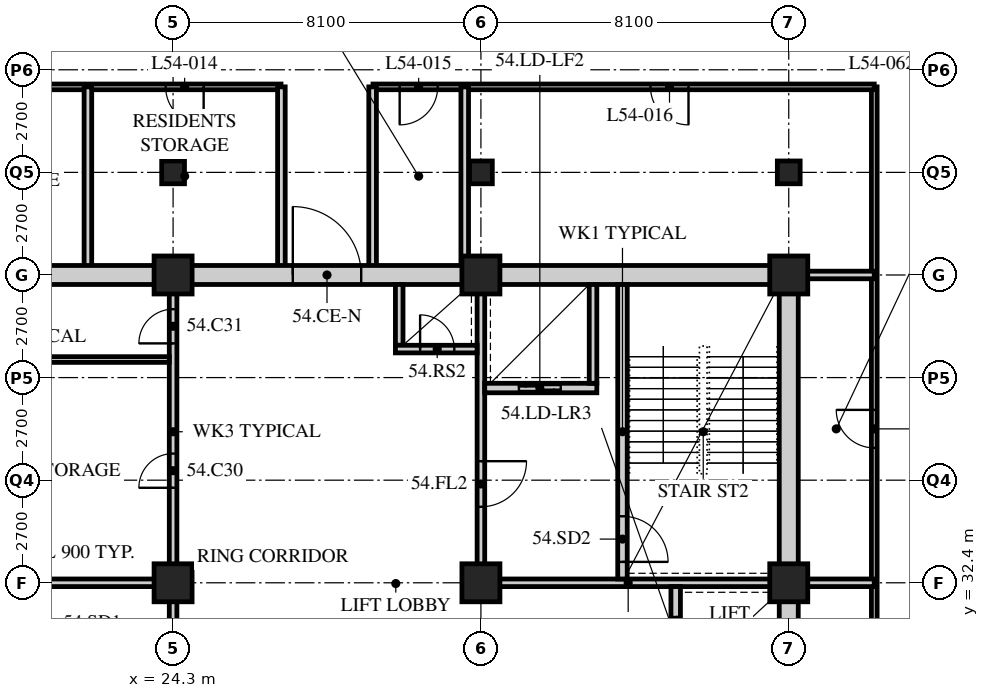
"""IFC4 building model, lengths in metres.
Left out: names, types, materials, properties, quantities, classifications, styles, units other than length and angle.
Written with IfcOpenShell. Run it as: python <this file> out.ifc"""

import sys

from ifc_helpers import new_model, si_unit, direction, frame, frame_2d, origin, origin_2d, place, context, subcontext, project, spatial, rectangle, hollow_rectangle, extrude, element, fill, save


model = new_model("IFC4")
c1 = context("Model", 3, precision=1e-05, world=origin(), true_north=direction((0.0, 1.0)))
c2 = subcontext(c1, "Body", "Model", "MODEL_VIEW")
j1 = project(units=[si_unit("LENGTHUNIT", "METRE"), si_unit("PLANEANGLEUNIT", "RADIAN")], contexts=[c1])
p1 = place(None, origin())
s1 = spatial("IfcSite", under=j1, at=p1, CompositionType="ELEMENT")
p2 = place(p1, origin())
s2 = spatial("IfcBuilding", under=s1, at=p2, CompositionType="ELEMENT")
p3 = place(p2, frame((0.0, 0.0, 210.0)))
s3 = spatial("IfcBuildingStorey", under=s2, at=p3, CompositionType="ELEMENT", Elevation=210.0)
for number, where, z_axis, x_axis in (
    (1, (24.3, 32.4, 0.0), (0.0, 0.0, 1.0), (1.0, 0.0, 0.0)),
    (2, (24.3, 40.5, 0.0), (0.0, 0.0, 1.0), (1.0, 0.0, 0.0)),
):
    element("IfcColumn", number, at=place(p3, frame(where, z_axis=z_axis, x_axis=x_axis)), inside=s3, PredefinedType="COLUMN", context=c2, shape_type="SweptSolid", body=[
        extrude(hollow_rectangle(XDim=1.0, YDim=1.0, WallThickness=0.1, at=origin_2d()), origin(), (0.0, 0.0, 1.0), 3.6),
    ])
p4 = place(p3, frame((24.3, 43.2, 0.0), z_axis=(0.0, 0.0, 1.0), x_axis=(1.0, 0.0, 0.0)))
e3 = element("IfcColumn", 3, at=p4, inside=s3, PredefinedType="COLUMN", context=c2, shape_type="SweptSolid", body=[
    extrude(hollow_rectangle(XDim=0.6, YDim=0.6, WallThickness=0.05, at=origin_2d()), origin(), (0.0, 0.0, 1.0), 3.6),
])
for number, where, z_axis, x_axis in (
    (4, (32.4, 32.4, 0.0), (0.0, 0.0, 1.0), (1.0, 0.0, 0.0)),
    (5, (32.4, 40.5, 0.0), (0.0, 0.0, 1.0), (1.0, 0.0, 0.0)),
):
    element("IfcColumn", number, at=place(p3, frame(where, z_axis=z_axis, x_axis=x_axis)), inside=s3, PredefinedType="COLUMN", context=c2, shape_type="SweptSolid", body=[
        extrude(hollow_rectangle(XDim=1.0, YDim=1.0, WallThickness=0.1, at=origin_2d()), origin(), (0.0, 0.0, 1.0), 3.6),
    ])
p5 = place(p3, frame((32.4, 43.2, 0.0), z_axis=(0.0, 0.0, 1.0), x_axis=(1.0, 0.0, 0.0)))
e6 = element("IfcColumn", 6, at=p5, inside=s3, PredefinedType="COLUMN", context=c2, shape_type="SweptSolid", body=[
    extrude(hollow_rectangle(XDim=0.6, YDim=0.6, WallThickness=0.05, at=origin_2d()), origin(), (0.0, 0.0, 1.0), 3.6),
])
for number, where, z_axis, x_axis in (
    (7, (40.5, 32.4, 0.0), (0.0, 0.0, 1.0), (1.0, 0.0, 0.0)),
    (8, (40.5, 40.5, 0.0), (0.0, 0.0, 1.0), (1.0, 0.0, 0.0)),
):
    element("IfcColumn", number, at=place(p3, frame(where, z_axis=z_axis, x_axis=x_axis)), inside=s3, PredefinedType="COLUMN", context=c2, shape_type="SweptSolid", body=[
        extrude(hollow_rectangle(XDim=1.0, YDim=1.0, WallThickness=0.1, at=origin_2d()), origin(), (0.0, 0.0, 1.0), 3.6),
    ])
p6 = place(p3, frame((40.5, 43.2, 0.0), z_axis=(0.0, 0.0, 1.0), x_axis=(1.0, 0.0, 0.0)))
e9 = element("IfcColumn", 9, at=p6, inside=s3, PredefinedType="COLUMN", context=c2, shape_type="SweptSolid", body=[
    extrude(hollow_rectangle(XDim=0.6, YDim=0.6, WallThickness=0.05, at=origin_2d()), origin(), (0.0, 0.0, 1.0), 3.6),
])
p7 = place(p3, frame((42.75, 20.7, 0.0), z_axis=(0.0, 0.0, 1.0), x_axis=(0.0, 1.0, 0.0)))
e10 = element("IfcWall", 10, at=p7, inside=s3, PredefinedType="PARTITIONING", context=c2, shape_type="SweptSolid", body=[
    extrude(rectangle(XDim=24.75, YDim=0.15, at=frame_2d((12.375, 0.0))), origin(), (0.0, 0.0, 1.0), 3.39),
])
p8 = place(p7, frame((7.15, 0.0, 0.0)))
e11 = element("IfcOpeningElement", 11, at=p8, cuts=e10, PredefinedType="OPENING", context=c2, shape_type="SweptSolid", body=[
    extrude(rectangle(XDim=1.0, YDim=2.1, at=frame_2d((0.5, 1.05))), frame((0.0, 0.085, 0.0), z_axis=(0.0, -1.0, 0.0), x_axis=(1.0, 0.0, 0.0)), (0.0, 0.0, 1.0), 0.17),
])
p9 = place(p7, frame((15.25, 0.0, 0.0)))
e12 = element("IfcOpeningElement", 12, at=p9, cuts=e10, PredefinedType="OPENING", context=c2, shape_type="SweptSolid", body=[
    extrude(rectangle(XDim=1.0, YDim=2.1, at=frame_2d((0.5, 1.05))), frame((0.0, 0.085, 0.0), z_axis=(0.0, -1.0, 0.0), x_axis=(1.0, 0.0, 0.0)), (0.0, 0.0, 1.0), 0.17),
])
p10 = place(p3, frame((42.75, 45.45, 0.0), z_axis=(0.0, 0.0, 1.0), x_axis=(-1.0, 0.0, 0.0)))
e13 = element("IfcWall", 13, at=p10, inside=s3, PredefinedType="PARTITIONING", context=c2, shape_type="SweptSolid", body=[
    extrude(rectangle(XDim=13.19, YDim=0.15, at=frame_2d((6.595, 0.0))), origin(), (0.0, 0.0, 1.0), 3.39),
])
p11 = place(p10, frame((11.488, 0.0, 0.0)))
e14 = element("IfcOpeningElement", 14, at=p11, cuts=e13, PredefinedType="OPENING", context=c2, shape_type="SweptSolid", body=[
    extrude(rectangle(XDim=1.0, YDim=2.1, at=frame_2d((0.5, 1.05))), frame((0.0, 0.085, 0.0), z_axis=(0.0, -1.0, 0.0), x_axis=(1.0, 0.0, 0.0)), (0.0, 0.0, 1.0), 0.17),
])
p12 = place(p10, frame((4.888, 0.0, 0.0)))
e15 = element("IfcOpeningElement", 15, at=p12, cuts=e13, PredefinedType="OPENING", context=c2, shape_type="SweptSolid", body=[
    extrude(rectangle(XDim=1.0, YDim=2.1, at=frame_2d((0.5, 1.05))), frame((0.0, 0.085, 0.0), z_axis=(0.0, -1.0, 0.0), x_axis=(1.0, 0.0, 0.0)), (0.0, 0.0, 1.0), 0.17),
])
p13 = place(p3, frame((27.14, 45.45, 0.0), z_axis=(0.0, 0.0, 1.0), x_axis=(-1.0, 0.0, 0.0)))
e16 = element("IfcWall", 16, at=p13, inside=s3, PredefinedType="PARTITIONING", context=c2, shape_type="SweptSolid", body=[
    extrude(rectangle(XDim=17.24, YDim=0.15, at=frame_2d((8.62, 0.0))), origin(), (0.0, 0.0, 1.0), 3.39),
])
p14 = place(p13, frame((15.94, 0.0, 0.0)))
e17 = element("IfcOpeningElement", 17, at=p14, cuts=e16, PredefinedType="OPENING", context=c2, shape_type="SweptSolid", body=[
    extrude(rectangle(XDim=1.0, YDim=2.1, at=frame_2d((0.5, 1.05))), frame((0.0, 0.085, 0.0), z_axis=(0.0, -1.0, 0.0), x_axis=(1.0, 0.0, 0.0)), (0.0, 0.0, 1.0), 0.17),
])
p15 = place(p13, frame((12.79, 0.0, 0.0)))
e18 = element("IfcOpeningElement", 18, at=p15, cuts=e16, PredefinedType="OPENING", context=c2, shape_type="SweptSolid", body=[
    extrude(rectangle(XDim=1.0, YDim=2.1, at=frame_2d((0.5, 1.05))), frame((0.0, 0.085, 0.0), z_axis=(0.0, -1.0, 0.0), x_axis=(1.0, 0.0, 0.0)), (0.0, 0.0, 1.0), 0.17),
])
p16 = place(p13, frame((7.511, 0.0, 0.0)))
e19 = element("IfcOpeningElement", 19, at=p16, cuts=e16, PredefinedType="OPENING", context=c2, shape_type="SweptSolid", body=[
    extrude(rectangle(XDim=1.0, YDim=2.1, at=frame_2d((0.5, 1.05))), frame((0.0, 0.085, 0.0), z_axis=(0.0, -1.0, 0.0), x_axis=(1.0, 0.0, 0.0)), (0.0, 0.0, 1.0), 0.17),
])
p17 = place(p13, frame((2.036, 0.0, 0.0)))
e20 = element("IfcOpeningElement", 20, at=p17, cuts=e16, PredefinedType="OPENING", context=c2, shape_type="SweptSolid", body=[
    extrude(rectangle(XDim=1.0, YDim=2.1, at=frame_2d((0.5, 1.05))), frame((0.0, 0.085, 0.0), z_axis=(0.0, -1.0, 0.0), x_axis=(1.0, 0.0, 0.0)), (0.0, 0.0, 1.0), 0.17),
])
p18 = place(p3, frame((40.5, 32.4, 0.0), z_axis=(0.0, 0.0, 1.0), x_axis=(1.0, 0.0, 0.0)))
e21 = element("IfcWall", 21, at=p18, inside=s3, PredefinedType="SOLIDWALL", context=c2, shape_type="SweptSolid", body=[
    extrude(rectangle(XDim=2.25, YDim=0.2, at=frame_2d((1.125, 0.0))), origin(), (0.0, 0.0, 1.0), 3.39),
])
p19 = place(p3, frame((22.059, 45.45, 0.0), z_axis=(0.0, 0.0, 1.0), x_axis=(0.0, -1.0, 0.0)))
e22 = element("IfcWall", 22, at=p19, inside=s3, PredefinedType="SOLIDWALL", context=c2, shape_type="SweptSolid", body=[
    extrude(rectangle(XDim=4.95, YDim=0.2, at=frame_2d((2.475, 0.0))), origin(), (0.0, 0.0, 1.0), 3.39),
])
p20 = place(p3, frame((31.974, 45.45, 0.0), z_axis=(0.0, 0.0, 1.0), x_axis=(0.0, -1.0, 0.0)))
e23 = element("IfcWall", 23, at=p20, inside=s3, PredefinedType="SOLIDWALL", context=c2, shape_type="SweptSolid", body=[
    extrude(rectangle(XDim=4.95, YDim=0.2, at=frame_2d((2.475, 0.0))), origin(), (0.0, 0.0, 1.0), 2.69),
])
for number, where, z_axis, x_axis in (
    (24, (27.15, 40.5, 0.0), (0.0, 0.0, 1.0), (0.0, 1.0, 0.0)),
    (25, (29.55, 40.5, 0.0), (0.0, 0.0, 1.0), (0.0, 1.0, 0.0)),
):
    element("IfcWall", number, at=place(p3, frame(where, z_axis=z_axis, x_axis=x_axis)), inside=s3, PredefinedType="SOLIDWALL", context=c2, shape_type="SweptSolid", body=[
        extrude(rectangle(XDim=4.95, YDim=0.2, at=frame_2d((2.475, 0.0))), origin(), (0.0, 0.0, 1.0), 3.39),
    ])
p21 = place(p3, frame((40.5, 40.5, 0.0), z_axis=(0.0, 0.0, 1.0), x_axis=(1.0, 0.0, 0.0)))
e26 = element("IfcWall", 26, at=p21, inside=s3, PredefinedType="SOLIDWALL", context=c2, shape_type="SweptSolid", body=[
    extrude(rectangle(XDim=2.25, YDim=0.2, at=frame_2d((1.125, 0.0))), origin(), (0.0, 0.0, 1.0), 3.39),
])
p22 = place(p3, frame((15.95, 40.5, 0.0), z_axis=(0.0, 0.0, 1.0), x_axis=(1.0, 0.0, 0.0)))
e27 = element("IfcWall", 27, at=p22, inside=s3, PredefinedType="SOLIDWALL", context=c2, shape_type="SweptSolid", body=[
    extrude(rectangle(XDim=24.8, YDim=0.5, at=frame_2d((12.4, 0.0))), origin(), (0.0, 0.0, 1.0), 2.74),
])
p23 = place(p22, frame((11.5, 0.0, 0.0)))
e28 = element("IfcOpeningElement", 28, at=p23, cuts=e27, PredefinedType="OPENING", context=c2, shape_type="SweptSolid", body=[
    extrude(rectangle(XDim=1.8, YDim=2.4, at=frame_2d((0.9, 1.2))), frame((0.0, 0.26, 0.0), z_axis=(0.0, -1.0, 0.0), x_axis=(1.0, 0.0, 0.0)), (0.0, 0.0, 1.0), 0.52),
])
p24 = place(p3, frame((40.5, 24.55, 0.0), z_axis=(0.0, 0.0, 1.0), x_axis=(0.0, 1.0, 0.0)))
e29 = element("IfcWall", 29, at=p24, inside=s3, PredefinedType="SOLIDWALL", context=c2, shape_type="SweptSolid", body=[
    extrude(rectangle(XDim=15.7, YDim=0.5, at=frame_2d((7.85, 0.0))), origin(), (0.0, 0.0, 1.0), 2.778),
])
p25 = place(p3, frame((16.45, 32.4, 0.0), z_axis=(0.0, 0.0, 1.0), x_axis=(1.0, 0.0, 0.0)))
e30 = element("IfcWall", 30, at=p25, inside=s3, PredefinedType="SOLIDWALL", context=c2, shape_type="SweptSolid", body=[
    extrude(rectangle(XDim=7.95, YDim=0.2, at=frame_2d((3.975, 0.0))), origin(), (0.0, 0.0, 1.0), 2.778),
])
p26 = place(p3, frame((24.3, 24.55, 0.0), z_axis=(0.0, 0.0, 1.0), x_axis=(0.0, 1.0, 0.0)))
e31 = element("IfcWall", 31, at=p26, inside=s3, PredefinedType="SOLIDWALL", context=c2, shape_type="SweptSolid", body=[
    extrude(rectangle(XDim=7.75, YDim=0.2, at=frame_2d((3.875, 0.0))), origin(), (0.0, 0.0, 1.0), 2.778),
])
p27 = place(p26, frame((4.6, 0.0, 0.0)))
e32 = element("IfcOpeningElement", 32, at=p27, cuts=e31, PredefinedType="OPENING", context=c2, shape_type="SweptSolid", body=[
    extrude(rectangle(XDim=1.2, YDim=2.1, at=frame_2d((0.6, 1.05))), frame((0.0, 0.11, 0.0), z_axis=(0.0, -1.0, 0.0), x_axis=(1.0, 0.0, 0.0)), (0.0, 0.0, 1.0), 0.22),
])
p28 = place(p3, frame((32.3, 32.4, 0.0), z_axis=(0.0, 0.0, 1.0), x_axis=(1.0, 0.0, 0.0)))
e33 = element("IfcWall", 33, at=p28, inside=s3, PredefinedType="SOLIDWALL", context=c2, shape_type="SweptSolid", body=[
    extrude(rectangle(XDim=7.95, YDim=0.2, at=frame_2d((3.975, 0.0))), origin(), (0.0, 0.0, 1.0), 2.778),
])
p29 = place(p3, frame((32.4, 32.5, 0.0), z_axis=(0.0, 0.0, 1.0), x_axis=(0.0, 1.0, 0.0)))
e34 = element("IfcWall", 34, at=p29, inside=s3, PredefinedType="SOLIDWALL", context=c2, shape_type="SweptSolid", body=[
    extrude(rectangle(XDim=7.75, YDim=0.2, at=frame_2d((3.875, 0.0))), origin(), (0.0, 0.0, 1.0), 2.778),
])
p30 = place(p29, frame((1.9, 0.0, 0.0)))
e35 = element("IfcOpeningElement", 35, at=p30, cuts=e34, PredefinedType="OPENING", context=c2, shape_type="SweptSolid", body=[
    extrude(rectangle(XDim=1.2, YDim=2.1, at=frame_2d((0.6, 1.05))), frame((0.0, 0.11, 0.0), z_axis=(0.0, -1.0, 0.0), x_axis=(1.0, 0.0, 0.0)), (0.0, 0.0, 1.0), 0.22),
])
p31 = place(p3, frame((37.525, 24.55, 0.0), z_axis=(0.0, 0.0, 1.0), x_axis=(0.0, 1.0, 0.0)))
e36 = element("IfcWall", 36, at=p31, inside=s3, PredefinedType="SOLIDWALL", context=c2, shape_type="SweptSolid", body=[
    extrude(rectangle(XDim=7.75, YDim=0.25, at=frame_2d((3.875, 0.0))), origin(), (0.0, 0.0, 1.0), 3.39),
])
p32 = place(p31, frame((0.65, 0.0, 0.0)))
e37 = element("IfcOpeningElement", 37, at=p32, cuts=e36, PredefinedType="OPENING", context=c2, shape_type="SweptSolid", body=[
    extrude(rectangle(XDim=1.1, YDim=2.4, at=frame_2d((0.55, 1.2))), frame((0.0, 0.135, 0.0), z_axis=(0.0, -1.0, 0.0), x_axis=(1.0, 0.0, 0.0)), (0.0, 0.0, 1.0), 0.27),
])
p33 = place(p31, frame((3.25, 0.0, 0.0)))
e38 = element("IfcOpeningElement", 38, at=p33, cuts=e36, PredefinedType="OPENING", context=c2, shape_type="SweptSolid", body=[
    extrude(rectangle(XDim=1.1, YDim=2.4, at=frame_2d((0.55, 1.2))), frame((0.0, 0.135, 0.0), z_axis=(0.0, -1.0, 0.0), x_axis=(1.0, 0.0, 0.0)), (0.0, 0.0, 1.0), 0.27),
])
p34 = place(p31, frame((5.85, 0.0, 0.0)))
e39 = element("IfcOpeningElement", 39, at=p34, cuts=e36, PredefinedType="OPENING", context=c2, shape_type="SweptSolid", body=[
    extrude(rectangle(XDim=1.1, YDim=2.4, at=frame_2d((0.55, 1.2))), frame((0.0, 0.135, 0.0), z_axis=(0.0, -1.0, 0.0), x_axis=(1.0, 0.0, 0.0)), (0.0, 0.0, 1.0), 0.27),
])
p35 = place(p3, frame((36.125, 32.5, 0.0), z_axis=(0.0, 0.0, 1.0), x_axis=(0.0, 1.0, 0.0)))
e40 = element("IfcWall", 40, at=p35, inside=s3, PredefinedType="SOLIDWALL", context=c2, shape_type="SweptSolid", body=[
    extrude(rectangle(XDim=7.75, YDim=0.25, at=frame_2d((3.875, 0.0))), origin(), (0.0, 0.0, 1.0), 3.39),
])
p36 = place(p35, frame((0.45, 0.0, 0.0)))
e41 = element("IfcOpeningElement", 41, at=p36, cuts=e40, PredefinedType="OPENING", context=c2, shape_type="SweptSolid", body=[
    extrude(rectangle(XDim=1.2, YDim=2.1, at=frame_2d((0.6, 1.05))), frame((0.0, 0.135, 0.0), z_axis=(0.0, -1.0, 0.0), x_axis=(1.0, 0.0, 0.0)), (0.0, 0.0, 1.0), 0.27),
])
p37 = place(p3, frame((32.5, 37.525, 0.0), z_axis=(0.0, 0.0, 1.0), x_axis=(1.0, 0.0, 0.0)))
e42 = element("IfcWall", 42, at=p37, inside=s3, PredefinedType="SOLIDWALL", context=c2, shape_type="SweptSolid", body=[
    extrude(rectangle(XDim=2.95, YDim=0.25, at=frame_2d((1.475, 0.0))), origin(), (0.0, 0.0, 1.0), 3.39),
])
p38 = place(p37, frame((0.9, 0.0, 0.0)))
e43 = element("IfcOpeningElement", 43, at=p38, cuts=e42, PredefinedType="OPENING", context=c2, shape_type="SweptSolid", body=[
    extrude(rectangle(XDim=1.1, YDim=2.4, at=frame_2d((0.55, 1.2))), frame((0.0, 0.135, 0.0), z_axis=(0.0, -1.0, 0.0), x_axis=(1.0, 0.0, 0.0)), (0.0, 0.0, 1.0), 0.27),
])
p39 = place(p3, frame((35.35, 37.65, 0.0), z_axis=(0.0, 0.0, 1.0), x_axis=(0.0, 1.0, 0.0)))
e44 = element("IfcWall", 44, at=p39, inside=s3, PredefinedType="SOLIDWALL", context=c2, shape_type="SweptSolid", body=[
    extrude(rectangle(XDim=2.6, YDim=0.2, at=frame_2d((1.3, 0.0))), origin(), (0.0, 0.0, 1.0), 3.39),
])
p40 = place(p3, frame((30.25, 38.65, 0.0), z_axis=(0.0, 0.0, 1.0), x_axis=(0.0, 1.0, 0.0)))
e45 = element("IfcWall", 45, at=p40, inside=s3, PredefinedType="SOLIDWALL", context=c2, shape_type="SweptSolid", body=[
    extrude(rectangle(XDim=1.6, YDim=0.2, at=frame_2d((0.8, 0.0))), origin(), (0.0, 0.0, 1.0), 3.39),
])
p41 = place(p3, frame((30.15, 38.55, 0.0), z_axis=(0.0, 0.0, 1.0), x_axis=(1.0, 0.0, 0.0)))
e46 = element("IfcWall", 46, at=p41, inside=s3, PredefinedType="SOLIDWALL", context=c2, shape_type="SweptSolid", body=[
    extrude(rectangle(XDim=2.15, YDim=0.2, at=frame_2d((1.075, 0.0))), origin(), (0.0, 0.0, 1.0), 3.39),
])
p42 = place(p41, frame((0.65, 0.0, 0.0)))
e47 = element("IfcOpeningElement", 47, at=p42, cuts=e46, PredefinedType="OPENING", context=c2, shape_type="SweptSolid", body=[
    extrude(rectangle(XDim=0.9, YDim=2.1, at=frame_2d((0.45, 1.05))), frame((0.0, 0.11, 0.0), z_axis=(0.0, -1.0, 0.0), x_axis=(1.0, 0.0, 0.0)), (0.0, 0.0, 1.0), 0.22),
])
p43 = place(p3, frame((24.3, 32.5, 0.0), z_axis=(0.0, 0.0, 1.0), x_axis=(0.0, 1.0, 0.0)))
e48 = element("IfcWall", 48, at=p43, inside=s3, PredefinedType="PARTITIONING", context=c2, shape_type="SweptSolid", body=[
    extrude(rectangle(XDim=7.75, YDim=0.2, at=frame_2d((3.875, 0.0))), origin(), (0.0, 0.0, 1.0), 2.778),
])
p44 = place(p43, frame((2.4, 0.0, 0.0)))
e49 = element("IfcOpeningElement", 49, at=p44, cuts=e48, PredefinedType="OPENING", context=c2, shape_type="SweptSolid", body=[
    extrude(rectangle(XDim=0.9, YDim=2.1, at=frame_2d((0.45, 1.05))), frame((0.0, 0.11, 0.0), z_axis=(0.0, -1.0, 0.0), x_axis=(1.0, 0.0, 0.0)), (0.0, 0.0, 1.0), 0.22),
])
p45 = place(p43, frame((6.2, 0.0, 0.0)))
e50 = element("IfcOpeningElement", 50, at=p45, cuts=e48, PredefinedType="OPENING", context=c2, shape_type="SweptSolid", body=[
    extrude(rectangle(XDim=0.9, YDim=2.1, at=frame_2d((0.45, 1.05))), frame((0.0, 0.11, 0.0), z_axis=(0.0, -1.0, 0.0), x_axis=(1.0, 0.0, 0.0)), (0.0, 0.0, 1.0), 0.22),
])
p46 = place(p3, frame((16.45, 38.275, 0.0), z_axis=(0.0, 0.0, 1.0), x_axis=(1.0, 0.0, 0.0)))
e51 = element("IfcWall", 51, at=p46, inside=s3, PredefinedType="PARTITIONING", context=c2, shape_type="SweptSolid", body=[
    extrude(rectangle(XDim=7.75, YDim=0.15, at=frame_2d((3.875, 0.0))), origin(), (0.0, 0.0, 1.0), 3.39),
])
p47 = place(p9, origin())
e52 = element("IfcDoor", 52, at=p47, inside=s3, OperationType="SINGLE_SWING_RIGHT", PredefinedType="DOOR", context=c2, shape_type="SweptSolid", body=[
    extrude(rectangle(XDim=1.0, YDim=2.1, at=frame_2d((0.5, 1.05))), frame((0.0, 0.025, 0.0), z_axis=(0.0, -1.0, 0.0), x_axis=(1.0, 0.0, 0.0)), (0.0, 0.0, 1.0), 0.05),
])
fill(e12, e52)
p48 = place(p17, origin())
e53 = element("IfcDoor", 53, at=p48, inside=s3, OperationType="SINGLE_SWING_LEFT", PredefinedType="DOOR", context=c2, shape_type="SweptSolid", body=[
    extrude(rectangle(XDim=1.0, YDim=2.1, at=frame_2d((0.5, 1.05))), frame((0.0, 0.025, 0.0), z_axis=(0.0, -1.0, 0.0), x_axis=(1.0, 0.0, 0.0)), (0.0, 0.0, 1.0), 0.05),
])
fill(e20, e53)
p49 = place(p11, origin())
e54 = element("IfcDoor", 54, at=p49, inside=s3, OperationType="SINGLE_SWING_RIGHT", PredefinedType="DOOR", context=c2, shape_type="SweptSolid", body=[
    extrude(rectangle(XDim=1.0, YDim=2.1, at=frame_2d((0.5, 1.05))), frame((0.0, 0.025, 0.0), z_axis=(0.0, -1.0, 0.0), x_axis=(1.0, 0.0, 0.0)), (0.0, 0.0, 1.0), 0.05),
])
fill(e14, e54)
p50 = place(p12, origin())
e55 = element("IfcDoor", 55, at=p50, inside=s3, OperationType="SINGLE_SWING_LEFT", PredefinedType="DOOR", context=c2, shape_type="SweptSolid", body=[
    extrude(rectangle(XDim=1.0, YDim=2.1, at=frame_2d((0.5, 1.05))), frame((0.0, 0.025, 0.0), z_axis=(0.0, -1.0, 0.0), x_axis=(1.0, 0.0, 0.0)), (0.0, 0.0, 1.0), 0.05),
])
fill(e15, e55)
p51 = place(p44, origin())
e56 = element("IfcDoor", 56, at=p51, inside=s3, OperationType="SINGLE_SWING_LEFT", PredefinedType="DOOR", context=c2, shape_type="SweptSolid", body=[
    extrude(rectangle(XDim=0.9, YDim=2.1, at=frame_2d((0.45, 1.05))), frame((0.0, 0.025, 0.0), z_axis=(0.0, -1.0, 0.0), x_axis=(1.0, 0.0, 0.0)), (0.0, 0.0, 1.0), 0.05),
])
fill(e49, e56)
p52 = place(p45, origin())
e57 = element("IfcDoor", 57, at=p52, inside=s3, OperationType="SINGLE_SWING_LEFT", PredefinedType="DOOR", context=c2, shape_type="SweptSolid", body=[
    extrude(rectangle(XDim=0.9, YDim=2.1, at=frame_2d((0.45, 1.05))), frame((0.0, 0.025, 0.0), z_axis=(0.0, -1.0, 0.0), x_axis=(1.0, 0.0, 0.0)), (0.0, 0.0, 1.0), 0.05),
])
fill(e50, e57)
p53 = place(p36, origin())
e58 = element("IfcDoor", 58, at=p53, inside=s3, OperationType="SINGLE_SWING_RIGHT", PredefinedType="DOOR", context=c2, shape_type="SweptSolid", body=[
    extrude(rectangle(XDim=1.2, YDim=2.1, at=frame_2d((0.6, 1.05))), frame((0.0, 0.025, 0.0), z_axis=(0.0, -1.0, 0.0), x_axis=(1.0, 0.0, 0.0)), (0.0, 0.0, 1.0), 0.05),
])
fill(e41, e58)
p54 = place(p30, origin())
e59 = element("IfcDoor", 59, at=p54, inside=s3, OperationType="SINGLE_SWING_LEFT", PredefinedType="DOOR", context=c2, shape_type="SweptSolid", body=[
    extrude(rectangle(XDim=1.2, YDim=2.1, at=frame_2d((0.6, 1.05))), frame((0.0, 0.025, 0.0), z_axis=(0.0, -1.0, 0.0), x_axis=(1.0, 0.0, 0.0)), (0.0, 0.0, 1.0), 0.05),
])
fill(e35, e59)
p55 = place(p42, origin())
e60 = element("IfcDoor", 60, at=p55, inside=s3, OperationType="SINGLE_SWING_LEFT", PredefinedType="DOOR", context=c2, shape_type="SweptSolid", body=[
    extrude(rectangle(XDim=0.9, YDim=2.1, at=frame_2d((0.45, 1.05))), frame((0.0, 0.025, 0.0), z_axis=(0.0, -1.0, 0.0), x_axis=(1.0, 0.0, 0.0)), (0.0, 0.0, 1.0), 0.05),
])
fill(e47, e60)
p56 = place(p34, origin())
e61 = element("IfcDoor", 61, at=p56, inside=s3, OperationType="DOUBLE_DOOR_SLIDING", PredefinedType="DOOR", context=c2, shape_type="SweptSolid", body=[
    extrude(rectangle(XDim=1.1, YDim=2.4, at=frame_2d((0.55, 1.2))), frame((0.0, 0.025, 0.0), z_axis=(0.0, -1.0, 0.0), x_axis=(1.0, 0.0, 0.0)), (0.0, 0.0, 1.0), 0.05),
])
fill(e39, e61)
p57 = place(p38, origin())
e62 = element("IfcDoor", 62, at=p57, inside=s3, OperationType="DOUBLE_DOOR_SLIDING", PredefinedType="DOOR", context=c2, shape_type="SweptSolid", body=[
    extrude(rectangle(XDim=1.1, YDim=2.4, at=frame_2d((0.55, 1.2))), frame((0.0, 0.025, 0.0), z_axis=(0.0, -1.0, 0.0), x_axis=(1.0, 0.0, 0.0)), (0.0, 0.0, 1.0), 0.05),
])
fill(e43, e62)
p58 = place(p23, origin())
e63 = element("IfcDoor", 63, at=p58, inside=s3, OperationType="DOUBLE_DOOR_SINGLE_SWING", PredefinedType="DOOR", context=c2, shape_type="SweptSolid", body=[
    extrude(rectangle(XDim=1.8, YDim=2.4, at=frame_2d((0.9, 1.2))), frame((0.0, 0.025, 0.0), z_axis=(0.0, -1.0, 0.0), x_axis=(1.0, 0.0, 0.0)), (0.0, 0.0, 1.0), 0.05),
])
fill(e28, e63)
save(model, sys.argv[1])
